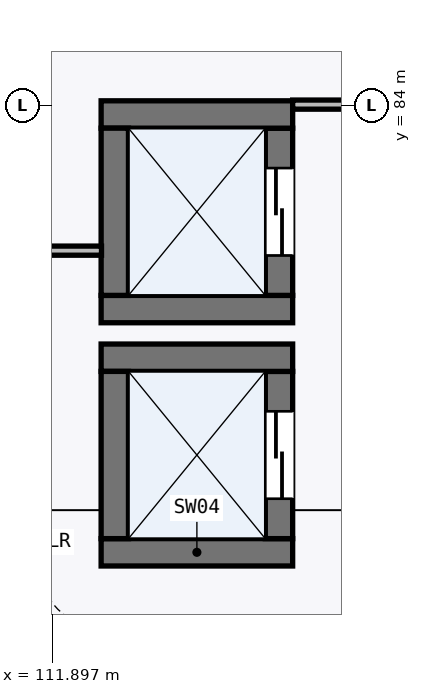
"""IFC4 building model, lengths in metres.
Left out: names, types, materials, properties, quantities, classifications, styles, units other than length and angle.
Written with IfcOpenShell. Run it as: python <this file> out.ifc"""

import sys

from ifc_helpers import new_model, si_unit, direction, frame, frame_2d, origin, place, context, subcontext, project, spatial, rectangle, extrude, element, fill, save


model = new_model("IFC4")
c1 = context("Model", 3, precision=1e-05, world=origin(), true_north=direction((0.0, 1.0)))
c2 = subcontext(c1, "Body", "Model", "MODEL_VIEW")
j1 = project(units=[si_unit("LENGTHUNIT", "METRE"), si_unit("PLANEANGLEUNIT", "RADIAN")], contexts=[c1])
p1 = place(None, origin())
s1 = spatial("IfcSite", under=j1, at=p1, CompositionType="ELEMENT")
p2 = place(p1, origin())
s2 = spatial("IfcBuilding", under=s1, at=p2, CompositionType="ELEMENT")
p3 = place(p2, frame((0.0, 0.0, 16.5)))
s3 = spatial("IfcBuildingStorey", under=s2, at=p3, CompositionType="ELEMENT", Elevation=16.5)
p4 = place(p3, frame((112.54, 78.12, 0.0), z_axis=(0.0, 0.0, 1.0), x_axis=(1.0, 0.0, 0.0)))
e1 = element("IfcWall", 1, at=p4, inside=s3, PredefinedType="SHEAR", context=c2, shape_type="SweptSolid", body=[
    extrude(rectangle(XDim=2.52, YDim=0.36, at=frame_2d((1.26, 0.0))), origin(), (0.0, 0.0, 1.0), 4.845),
])
p5 = place(p3, frame((114.88, 78.3, 0.0), z_axis=(0.0, 0.0, 1.0), x_axis=(0.0, 1.0, 0.0)))
e2 = element("IfcWall", 2, at=p5, inside=s3, PredefinedType="SHEAR", context=c2, shape_type="SweptSolid", body=[
    extrude(rectangle(XDim=2.2, YDim=0.36, at=frame_2d((1.1, 0.0))), origin(), (0.0, 0.0, 1.0), 4.845),
])
p6 = place(p5, frame((0.525, 0.0, 0.0)))
e3 = element("IfcOpeningElement", 3, at=p6, cuts=e2, PredefinedType="OPENING", context=c2, shape_type="SweptSolid", body=[
    extrude(rectangle(XDim=1.15, YDim=2.2, at=frame_2d((0.575, 1.1))), frame((0.0, 0.19, 0.0), z_axis=(0.0, -1.0, 0.0), x_axis=(1.0, 0.0, 0.0)), (0.0, 0.0, 1.0), 0.38),
])
p7 = place(p3, frame((115.06, 80.68, 0.0), z_axis=(0.0, 0.0, 1.0), x_axis=(-1.0, 0.0, 0.0)))
e4 = element("IfcWall", 4, at=p7, inside=s3, PredefinedType="SHEAR", context=c2, shape_type="SweptSolid", body=[
    extrude(rectangle(XDim=2.52, YDim=0.36, at=frame_2d((1.26, 0.0))), origin(), (0.0, 0.0, 1.0), 4.845),
])
p8 = place(p3, frame((112.72, 80.5, 0.0), z_axis=(0.0, 0.0, 1.0), x_axis=(0.0, -1.0, 0.0)))
e5 = element("IfcWall", 5, at=p8, inside=s3, PredefinedType="SHEAR", context=c2, shape_type="SweptSolid", body=[
    extrude(rectangle(XDim=2.2, YDim=0.36, at=frame_2d((1.1, 0.0))), origin(), (0.0, 0.0, 1.0), 4.845),
])
p9 = place(p3, frame((112.54, 81.32, 0.0), z_axis=(0.0, 0.0, 1.0), x_axis=(1.0, 0.0, 0.0)))
e6 = element("IfcWall", 6, at=p9, inside=s3, PredefinedType="SHEAR", context=c2, shape_type="SweptSolid", body=[
    extrude(rectangle(XDim=2.52, YDim=0.36, at=frame_2d((1.26, 0.0))), origin(), (0.0, 0.0, 1.0), 4.845),
])
p10 = place(p3, frame((114.88, 81.5, 0.0), z_axis=(0.0, 0.0, 1.0), x_axis=(0.0, 1.0, 0.0)))
e7 = element("IfcWall", 7, at=p10, inside=s3, PredefinedType="SHEAR", context=c2, shape_type="SweptSolid", body=[
    extrude(rectangle(XDim=2.2, YDim=0.36, at=frame_2d((1.1, 0.0))), origin(), (0.0, 0.0, 1.0), 4.845),
])
p11 = place(p10, frame((0.525, 0.0, 0.0)))
e8 = element("IfcOpeningElement", 8, at=p11, cuts=e7, PredefinedType="OPENING", context=c2, shape_type="SweptSolid", body=[
    extrude(rectangle(XDim=1.15, YDim=2.2, at=frame_2d((0.575, 1.1))), frame((0.0, 0.19, 0.0), z_axis=(0.0, -1.0, 0.0), x_axis=(1.0, 0.0, 0.0)), (0.0, 0.0, 1.0), 0.38),
])
p12 = place(p3, frame((115.06, 83.88, 0.0), z_axis=(0.0, 0.0, 1.0), x_axis=(-1.0, 0.0, 0.0)))
e9 = element("IfcWall", 9, at=p12, inside=s3, PredefinedType="SHEAR", context=c2, shape_type="SweptSolid", body=[
    extrude(rectangle(XDim=2.52, YDim=0.36, at=frame_2d((1.26, 0.0))), origin(), (0.0, 0.0, 1.0), 4.845),
])
p13 = place(p3, frame((112.72, 83.7, 0.0), z_axis=(0.0, 0.0, 1.0), x_axis=(0.0, -1.0, 0.0)))
e10 = element("IfcWall", 10, at=p13, inside=s3, PredefinedType="SHEAR", context=c2, shape_type="SweptSolid", body=[
    extrude(rectangle(XDim=2.2, YDim=0.36, at=frame_2d((1.1, 0.0))), origin(), (0.0, 0.0, 1.0), 4.845),
])
p14 = place(p3, frame((109.495, 82.089, 0.0), z_axis=(0.0, 0.0, 1.0), x_axis=(1.0, 0.0, 0.0)))
e11 = element("IfcWall", 11, at=p14, inside=s3, PredefinedType="PARTITIONING", context=c2, shape_type="SweptSolid", body=[
    extrude(rectangle(XDim=3.05, YDim=0.12, at=frame_2d((1.525, 0.0))), origin(), (0.0, 0.0, 1.0), 4.845),
])
p15 = place(p14, frame((1.0, 0.0, 0.0)))
e12 = element("IfcOpeningElement", 12, at=p15, cuts=e11, PredefinedType="OPENING", context=c2, shape_type="SweptSolid", body=[
    extrude(rectangle(XDim=1.05, YDim=2.1, at=frame_2d((0.525, 1.05))), frame((0.0, 0.07, 0.0), z_axis=(0.0, -1.0, 0.0), x_axis=(1.0, 0.0, 0.0)), (0.0, 0.0, 1.0), 0.14),
])
p16 = place(p3, frame((115.06, 84.01, 0.0), z_axis=(0.0, 0.0, 1.0), x_axis=(1.0, 0.0, 0.0)))
e13 = element("IfcWall", 13, at=p16, inside=s3, PredefinedType="PARTITIONING", context=c2, shape_type="SweptSolid", body=[
    extrude(rectangle(XDim=0.93, YDim=0.12, at=frame_2d((0.465, 0.0))), origin(), (0.0, 0.0, 1.0), 4.255),
])
p17 = place(p6, frame((1.15, 0.0, 0.0), z_axis=(0.0, 0.0, 1.0), x_axis=(-1.0, 0.0, 0.0)))
e14 = element("IfcDoor", 14, at=p17, inside=s3, OperationType="DOUBLE_DOOR_SLIDING", PredefinedType="DOOR", context=c2, shape_type="SweptSolid", body=[
    extrude(rectangle(XDim=1.15, YDim=2.2, at=frame_2d((0.575, 1.1))), frame((0.0, 0.025, 0.0), z_axis=(0.0, -1.0, 0.0), x_axis=(1.0, 0.0, 0.0)), (0.0, 0.0, 1.0), 0.05),
])
fill(e3, e14)
p18 = place(p11, frame((1.15, 0.0, 0.0), z_axis=(0.0, 0.0, 1.0), x_axis=(-1.0, 0.0, 0.0)))
e15 = element("IfcDoor", 15, at=p18, inside=s3, OperationType="DOUBLE_DOOR_SLIDING", PredefinedType="DOOR", context=c2, shape_type="SweptSolid", body=[
    extrude(rectangle(XDim=1.15, YDim=2.2, at=frame_2d((0.575, 1.1))), frame((0.0, 0.025, 0.0), z_axis=(0.0, -1.0, 0.0), x_axis=(1.0, 0.0, 0.0)), (0.0, 0.0, 1.0), 0.05),
])
fill(e8, e15)
save(model, sys.argv[1])
